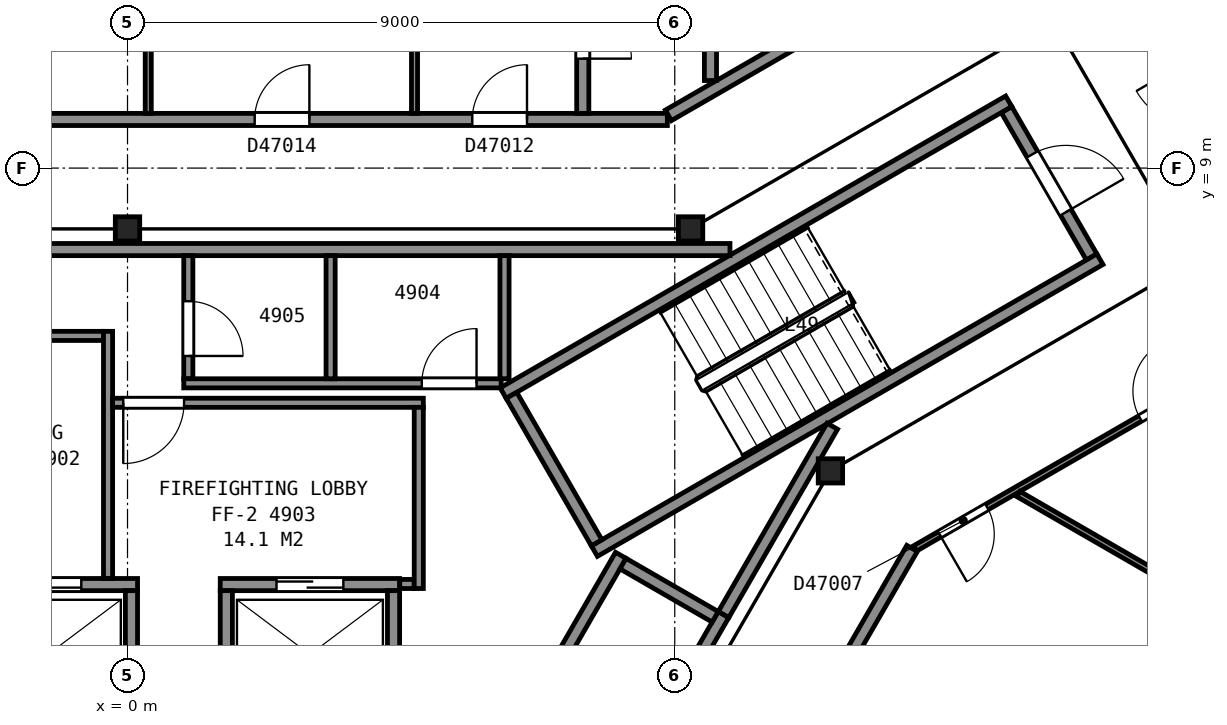
"""IFC4 building model, lengths in metres.
Left out: names, types, materials, properties, quantities, classifications, styles, units other than length and angle.
Written with IfcOpenShell. Run it as: python <this file> out.ifc"""

import sys

from ifc_helpers import new_model, si_unit, direction, frame, frame_2d, origin, origin_2d, place, context, subcontext, project, spatial, rectangle, i_section, extrude, element, fill, save


model = new_model("IFC4")
c1 = context("Model", 3, precision=1e-05, world=origin(), true_north=direction((0.0, 1.0)))
c2 = subcontext(c1, "Body", "Model", "MODEL_VIEW")
j1 = project(units=[si_unit("LENGTHUNIT", "METRE"), si_unit("PLANEANGLEUNIT", "RADIAN")], contexts=[c1])
p1 = place(None, origin())
s1 = spatial("IfcSite", under=j1, at=p1, CompositionType="ELEMENT")
p2 = place(p1, origin())
s2 = spatial("IfcBuilding", under=s1, at=p2, CompositionType="ELEMENT")
p3 = place(p2, frame((0.0, 0.0, 196.9)))
s3 = spatial("IfcBuildingStorey", under=s2, at=p3, CompositionType="ELEMENT", Elevation=196.9)
for number, where, z_axis, x_axis in (
    (1, (11.56, 4.02, 0.0), (0.0, 0.0, 1.0), (1.0, 0.0, 0.0)),
    (2, (9.26, 8.0, 0.0), (0.0, 0.0, 1.0), (1.0, 0.0, 0.0)),
    (3, (0.0, 8.0, 0.0), (0.0, 0.0, 1.0), (1.0, 0.0, 0.0)),
):
    element("IfcColumn", number, at=place(p3, frame(where, z_axis=z_axis, x_axis=x_axis)), inside=s3, PredefinedType="COLUMN", context=c2, shape_type="SweptSolid", body=[
        extrude(i_section(OverallWidth=0.401, OverallDepth=0.399, WebThickness=0.025, FlangeThickness=0.04, FilletRadius=0.015, at=origin_2d()), origin(), (0.0, 0.0, 1.0), 3.7),
    ])
p4 = place(p3, frame((15.855, 7.538, 0.0), z_axis=(0.0, 0.0, 1.0), x_axis=(-0.500049511043, 0.865996816683, 0.0)))
e4 = element("IfcWall", 4, at=p4, inside=s3, PredefinedType="PARTITIONING", context=c2, shape_type="SweptSolid", body=[
    extrude(rectangle(XDim=2.8, YDim=0.2, at=frame_2d((1.4, 0.0))), origin(), (0.0, 0.0, 1.0), 3.45),
])
p5 = place(p4, frame((0.85, 0.0, 0.0)))
e5 = element("IfcOpeningElement", 5, at=p5, cuts=e4, PredefinedType="OPENING", context=c2, shape_type="SweptSolid", body=[
    extrude(rectangle(XDim=1.1, YDim=2.1, at=frame_2d((0.55, 1.05))), frame((0.0, 0.11, 0.0), z_axis=(0.0, -1.0, 0.0), x_axis=(1.0, 0.0, 0.0)), (0.0, 0.0, 1.0), 0.22),
])
for number, where, z_axis, x_axis in (
    (6, (6.178, 5.299, 0.0), (0.0, 0.0, 1.0), (0.866, 0.5, 0.0)),
    (7, (7.678, 2.701, 0.0), (0.0, 0.0, 1.0), (0.866, 0.5, 0.0)),
):
    element("IfcWall", number, at=place(p3, frame(where, z_axis=z_axis, x_axis=x_axis)), inside=s3, PredefinedType="PARTITIONING", context=c2, shape_type="SweptSolid", body=[
        extrude(rectangle(XDim=9.6, YDim=0.2, at=frame_2d((4.8, 0.0))), origin(), (0.0, 0.0, 1.0), 3.45),
    ])
p6 = place(p3, frame((7.715, 2.838, 0.0), z_axis=(0.0, 0.0, 1.0), x_axis=(-0.500049511043, 0.865996816683, 0.0)))
e8 = element("IfcWall", 8, at=p6, inside=s3, PredefinedType="PARTITIONING", context=c2, shape_type="SweptSolid", body=[
    extrude(rectangle(XDim=2.8, YDim=0.2, at=frame_2d((1.4, 0.0))), origin(), (0.0, 0.0, 1.0), 3.45),
])
p7 = place(p3, frame((-2.785, 2.15, 0.0), z_axis=(0.0, 0.0, 1.0), x_axis=(1.0, 0.0, 0.0)))
e9 = element("IfcWall", 9, at=p7, inside=s3, PredefinedType="PARTITIONING", context=c2, shape_type="SweptSolid", body=[
    extrude(rectangle(XDim=2.95, YDim=0.2, at=frame_2d((1.475, 0.0))), origin(), (0.0, 0.0, 1.0), 3.7),
])
p8 = place(p7, frame((0.925, 0.0, 0.0)))
e10 = element("IfcOpeningElement", 10, at=p8, cuts=e9, PredefinedType="OPENING", context=c2, shape_type="SweptSolid", body=[
    extrude(rectangle(XDim=1.1, YDim=2.1, at=frame_2d((0.55, 1.05))), frame((0.0, 0.11, 0.0), z_axis=(0.0, -1.0, 0.0), x_axis=(1.0, 0.0, 0.0)), (0.0, 0.0, 1.0), 0.22),
])
p9 = place(p3, frame((1.525, 2.15, 0.0), z_axis=(0.0, 0.0, 1.0), x_axis=(1.0, 0.0, 0.0)))
e11 = element("IfcWall", 11, at=p9, inside=s3, PredefinedType="PARTITIONING", context=c2, shape_type="SweptSolid", body=[
    extrude(rectangle(XDim=2.95, YDim=0.2, at=frame_2d((1.475, 0.0))), origin(), (0.0, 0.0, 1.0), 3.7),
])
p10 = place(p9, frame((0.925, 0.0, 0.0)))
e12 = element("IfcOpeningElement", 12, at=p10, cuts=e11, PredefinedType="OPENING", context=c2, shape_type="SweptSolid", body=[
    extrude(rectangle(XDim=1.1, YDim=2.1, at=frame_2d((0.55, 1.05))), frame((0.0, 0.11, 0.0), z_axis=(0.0, -1.0, 0.0), x_axis=(1.0, 0.0, 0.0)), (0.0, 0.0, 1.0), 0.22),
])
p11 = place(p3, frame((7.351, -2.587, 0.0), z_axis=(0.0, 0.0, 1.0), x_axis=(0.500002801628, 0.866023786258, 0.0)))
e13 = element("IfcWall", 13, at=p11, inside=s3, PredefinedType="PARTITIONING", context=c2, shape_type="SweptSolid", body=[
    extrude(rectangle(XDim=4.9, YDim=0.2, at=frame_2d((2.45, 0.0))), origin(), (0.0, 0.0, 1.0), 3.7),
])
p12 = place(p3, frame((5.663, -1.612, 0.0), z_axis=(0.0, 0.0, 1.0), x_axis=(0.49998122708, 0.866036242063, 0.0)))
e14 = element("IfcWall", 14, at=p12, inside=s3, PredefinedType="PARTITIONING", context=c2, shape_type="SweptSolid", body=[
    extrude(rectangle(XDim=4.9, YDim=0.2, at=frame_2d((2.45, 0.0))), origin(), (0.0, 0.0, 1.0), 3.7),
])
for number, where, z_axis, x_axis in (
    (15, (4.375, 0.1, 0.0), (0.0, 0.0, 1.0), (0.0, 1.0, 0.0)),
    (16, (1.625, 0.1, 0.0), (0.0, 0.0, 1.0), (0.0, 1.0, 0.0)),
    (17, (0.065, 0.1, 0.0), (0.0, 0.0, 1.0), (0.0, 1.0, 0.0)),
):
    element("IfcWall", number, at=place(p3, frame(where, z_axis=z_axis, x_axis=x_axis)), inside=s3, PredefinedType="PARTITIONING", context=c2, shape_type="SweptSolid", body=[
        extrude(rectangle(XDim=1.95, YDim=0.2, at=frame_2d((0.975, 0.0))), origin(), (0.0, 0.0, 1.0), 3.7),
    ])
p13 = place(p3, frame((9.665, 1.62, 0.0), z_axis=(0.0, 0.0, 1.0), x_axis=(-0.866002029911, 0.500040482552, 0.0)))
e18 = element("IfcWall", 18, at=p13, inside=s3, PredefinedType="PARTITIONING", context=c2, shape_type="SweptSolid", body=[
    extrude(rectangle(XDim=1.75, YDim=0.2, at=frame_2d((0.875, 0.0))), origin(), (0.0, 0.0, 1.0), 3.7),
])
p14 = place(p3, frame((-3.933, 6.24, 0.0), z_axis=(0.0, 0.0, 1.0), x_axis=(1.0, 0.0, 0.0)))
e19 = element("IfcWall", 19, at=p14, inside=s3, PredefinedType="PARTITIONING", context=c2, shape_type="SweptSolid", body=[
    extrude(rectangle(XDim=3.538, YDim=0.15, at=frame_2d((1.769, 0.0))), origin(), (0.0, 0.0, 1.0), 3.45),
])
p15 = place(p14, frame((1.3, 0.0, 0.0)))
e20 = element("IfcOpeningElement", 20, at=p15, cuts=e19, PredefinedType="OPENING", context=c2, shape_type="SweptSolid", body=[
    extrude(rectangle(XDim=1.0, YDim=2.1, at=frame_2d((0.5, 1.05))), frame((0.0, 0.085, 0.0), z_axis=(0.0, -1.0, 0.0), x_axis=(1.0, 0.0, 0.0)), (0.0, 0.0, 1.0), 0.17),
])
p16 = place(p3, frame((-3.933, 7.66, 0.0), z_axis=(0.0, 0.0, 1.0), x_axis=(1.0, 0.0, 0.0)))
e21 = element("IfcWall", 21, at=p16, inside=s3, PredefinedType="PARTITIONING", context=c2, shape_type="SweptSolid", body=[
    extrude(rectangle(XDim=13.841, YDim=0.2, at=frame_2d((6.92, 0.0))), origin(), (0.0, 0.0, 1.0), 3.45),
])
p17 = place(p3, frame((-0.32, 2.252, 0.0), z_axis=(0.0, 0.0, 1.0), x_axis=(0.0, 1.0, 0.0)))
e22 = element("IfcWall", 22, at=p17, inside=s3, PredefinedType="PARTITIONING", context=c2, shape_type="SweptSolid", body=[
    extrude(rectangle(XDim=4.063, YDim=0.15, at=frame_2d((2.031, 0.0))), origin(), (0.0, 0.0, 1.0), 3.45),
])
p18 = place(p3, frame((-0.245, 5.14, 0.0), z_axis=(0.0, 0.0, 1.0), x_axis=(1.0, 0.0, 0.0)))
e23 = element("IfcWall", 23, at=p18, inside=s3, PredefinedType="PARTITIONING", context=c2, shape_type="SweptSolid", body=[
    extrude(rectangle(XDim=5.11, YDim=0.15, at=frame_2d((2.555, 0.0))), origin(), (0.0, 0.0, 1.0), 3.45),
])
p19 = place(p18, frame((0.175, 0.0, 0.0)))
e24 = element("IfcOpeningElement", 24, at=p19, cuts=e23, PredefinedType="OPENING", context=c2, shape_type="SweptSolid", body=[
    extrude(rectangle(XDim=1.0, YDim=2.1, at=frame_2d((0.5, 1.05))), frame((0.0, 0.085, 0.0), z_axis=(0.0, -1.0, 0.0), x_axis=(1.0, 0.0, 0.0)), (0.0, 0.0, 1.0), 0.17),
])
p20 = place(p3, frame((1.0, 7.56, 0.0), z_axis=(0.0, 0.0, 1.0), x_axis=(0.0, -1.0, 0.0)))
e25 = element("IfcWall", 25, at=p20, inside=s3, PredefinedType="PARTITIONING", context=c2, shape_type="SweptSolid", body=[
    extrude(rectangle(XDim=2.025, YDim=0.15, at=frame_2d((1.013, 0.0))), origin(), (0.0, 0.0, 1.0), 3.45),
])
p21 = place(p20, frame((0.75, 0.0, 0.0)))
e26 = element("IfcOpeningElement", 26, at=p21, cuts=e25, PredefinedType="OPENING", context=c2, shape_type="SweptSolid", body=[
    extrude(rectangle(XDim=0.9, YDim=2.1, at=frame_2d((0.45, 1.05))), frame((0.0, 0.085, 0.0), z_axis=(0.0, -1.0, 0.0), x_axis=(1.0, 0.0, 0.0)), (0.0, 0.0, 1.0), 0.17),
])
p22 = place(p3, frame((0.925, 5.46, 0.0), z_axis=(0.0, 0.0, 1.0), x_axis=(1.0, 0.0, 0.0)))
e27 = element("IfcWall", 27, at=p22, inside=s3, PredefinedType="PARTITIONING", context=c2, shape_type="SweptSolid", body=[
    extrude(rectangle(XDim=5.22, YDim=0.15, at=frame_2d((2.61, 0.0))), origin(), (0.0, 0.0, 1.0), 3.45),
])
p23 = place(p22, frame((3.915, 0.0, 0.0)))
e28 = element("IfcOpeningElement", 28, at=p23, cuts=e27, PredefinedType="OPENING", context=c2, shape_type="SweptSolid", body=[
    extrude(rectangle(XDim=0.9, YDim=2.1, at=frame_2d((0.45, 1.05))), frame((0.0, 0.085, 0.0), z_axis=(0.0, -1.0, 0.0), x_axis=(1.0, 0.0, 0.0)), (0.0, 0.0, 1.0), 0.17),
])
p24 = place(p3, frame((3.34, 5.535, 0.0), z_axis=(0.0, 0.0, 1.0), x_axis=(0.0, 1.0, 0.0)))
e29 = element("IfcWall", 29, at=p24, inside=s3, PredefinedType="PARTITIONING", context=c2, shape_type="SweptSolid", body=[
    extrude(rectangle(XDim=2.025, YDim=0.15, at=frame_2d((1.013, 0.0))), origin(), (0.0, 0.0, 1.0), 3.45),
])
p25 = place(p3, frame((4.477, 2.16, 0.0), z_axis=(0.0, 0.0, 1.0), x_axis=(1.0, 0.0, 0.0)))
e30 = element("IfcWall", 30, at=p25, inside=s3, PredefinedType="PARTITIONING", context=c2, shape_type="SweptSolid", body=[
    extrude(rectangle(XDim=0.238, YDim=0.15, at=frame_2d((0.119, 0.0))), origin(), (0.0, 0.0, 1.0), 3.45),
])
p26 = place(p3, frame((4.79, 2.085, 0.0), z_axis=(0.0, 0.0, 1.0), x_axis=(0.0, 1.0, 0.0)))
e31 = element("IfcWall", 31, at=p26, inside=s3, PredefinedType="PARTITIONING", context=c2, shape_type="SweptSolid", body=[
    extrude(rectangle(XDim=2.98, YDim=0.15, at=frame_2d((1.49, 0.0))), origin(), (0.0, 0.0, 1.0), 3.45),
])
p27 = place(p3, frame((6.2, 5.535, 0.0), z_axis=(0.0, 0.0, 1.0), x_axis=(0.0, 1.0, 0.0)))
e32 = element("IfcWall", 32, at=p27, inside=s3, PredefinedType="PARTITIONING", context=c2, shape_type="SweptSolid", body=[
    extrude(rectangle(XDim=2.025, YDim=0.15, at=frame_2d((1.013, 0.0))), origin(), (0.0, 0.0, 1.0), 3.45),
])
p28 = place(p3, frame((9.803, 1.658, 0.0), z_axis=(0.0, 0.0, 1.0), x_axis=(0.499943114462, 0.866058244174, 0.0)))
e33 = element("IfcWall", 33, at=p28, inside=s3, PredefinedType="PARTITIONING", context=c2, shape_type="SweptSolid", body=[
    extrude(rectangle(XDim=3.576, YDim=0.2, at=frame_2d((1.788, 0.0))), origin(), (0.0, 0.0, 1.0), 3.45),
])
p29 = place(p3, frame((-8.828, 9.8, 0.0), z_axis=(0.0, 0.0, 1.0), x_axis=(1.0, 0.0, 0.0)))
e34 = element("IfcWall", 34, at=p29, inside=s3, PredefinedType="PARTITIONING", context=c2, shape_type="SweptSolid", body=[
    extrude(rectangle(XDim=17.706, YDim=0.2, at=frame_2d((8.853, 0.0))), origin(), (0.0, 0.0, 1.0), 2.362),
])
p30 = place(p29, frame((14.498, 0.0, 0.0)))
e35 = element("IfcOpeningElement", 35, at=p30, cuts=e34, PredefinedType="OPENING", context=c2, shape_type="SweptSolid", body=[
    extrude(rectangle(XDim=0.9, YDim=2.1, at=frame_2d((0.45, 1.05))), frame((0.0, 0.11, 0.0), z_axis=(0.0, -1.0, 0.0), x_axis=(1.0, 0.0, 0.0)), (0.0, 0.0, 1.0), 0.22),
])
p31 = place(p29, frame((10.919, 0.0, 0.0)))
e36 = element("IfcOpeningElement", 36, at=p31, cuts=e34, PredefinedType="OPENING", context=c2, shape_type="SweptSolid", body=[
    extrude(rectangle(XDim=0.9, YDim=2.1, at=frame_2d((0.45, 1.05))), frame((0.0, 0.11, 0.0), z_axis=(0.0, -1.0, 0.0), x_axis=(1.0, 0.0, 0.0)), (0.0, 0.0, 1.0), 0.22),
])
p32 = place(p29, frame((6.113, 0.0, 0.0)))
e37 = element("IfcOpeningElement", 37, at=p32, cuts=e34, PredefinedType="OPENING", context=c2, shape_type="SweptSolid", body=[
    extrude(rectangle(XDim=0.9, YDim=2.1, at=frame_2d((0.45, 1.05))), frame((0.0, 0.11, 0.0), z_axis=(0.0, -1.0, 0.0), x_axis=(1.0, 0.0, 0.0)), (0.0, 0.0, 1.0), 0.22),
])
for number, where, z_axis, x_axis in (
    (38, (0.341, 9.9, 0.0), (0.0, 0.0, 1.0), (0.0, 1.0, 0.0)),
    (39, (4.72, 9.9, 0.0), (0.0, 0.0, 1.0), (0.0, 1.0, 0.0)),
):
    element("IfcWall", number, at=place(p3, frame(where, z_axis=z_axis, x_axis=x_axis)), inside=s3, PredefinedType="PARTITIONING", context=c2, shape_type="SweptSolid", body=[
        extrude(rectangle(XDim=8.435, YDim=0.1, at=frame_2d((4.218, 0.0))), origin(), (0.0, 0.0, 1.0), 2.362),
    ])
p33 = place(p3, frame((12.903, 2.745, 0.0), z_axis=(0.0, 0.0, 1.0), x_axis=(-0.499992063946, -0.866029985619, 0.0)))
e40 = element("IfcWall", 40, at=p33, inside=s3, PredefinedType="PARTITIONING", context=c2, shape_type="SweptSolid", body=[
    extrude(rectangle(XDim=12.907, YDim=0.2, at=frame_2d((6.454, 0.0))), origin(), (0.0, 0.0, 1.0), 2.362),
])
p34 = place(p33, frame((9.032, 0.0, 0.0)))
e41 = element("IfcOpeningElement", 41, at=p34, cuts=e40, PredefinedType="OPENING", context=c2, shape_type="SweptSolid", body=[
    extrude(rectangle(XDim=0.9, YDim=2.1, at=frame_2d((0.45, 1.05))), frame((0.0, 0.11, 0.0), z_axis=(0.0, -1.0, 0.0), x_axis=(1.0, 0.0, 0.0)), (0.0, 0.0, 1.0), 0.22),
])
p35 = place(p33, frame((5.349, 0.0, 0.0)))
e42 = element("IfcOpeningElement", 42, at=p35, cuts=e40, PredefinedType="OPENING", context=c2, shape_type="SweptSolid", body=[
    extrude(rectangle(XDim=0.9, YDim=2.1, at=frame_2d((0.45, 1.05))), frame((0.0, 0.11, 0.0), z_axis=(0.0, -1.0, 0.0), x_axis=(1.0, 0.0, 0.0)), (0.0, 0.0, 1.0), 0.22),
])
p36 = place(p3, frame((7.487, 12.7, 0.0), z_axis=(0.0, 0.0, 1.0), x_axis=(0.0, -1.0, 0.0)))
e43 = element("IfcWall", 43, at=p36, inside=s3, PredefinedType="PARTITIONING", context=c2, shape_type="SweptSolid", body=[
    extrude(rectangle(XDim=2.8, YDim=0.2, at=frame_2d((1.4, 0.0))), origin(), (0.0, 0.0, 1.0), 2.362),
])
p37 = place(p36, frame((1.1, 0.0, 0.0)))
e44 = element("IfcOpeningElement", 44, at=p37, cuts=e43, PredefinedType="OPENING", context=c2, shape_type="SweptSolid", body=[
    extrude(rectangle(XDim=0.8, YDim=2.1, at=frame_2d((0.4, 1.05))), frame((0.0, 0.11, 0.0), z_axis=(0.0, -1.0, 0.0), x_axis=(1.0, 0.0, 0.0)), (0.0, 0.0, 1.0), 0.22),
])
p38 = place(p3, frame((8.895, 9.867, 0.0), z_axis=(0.0, 0.0, 1.0), x_axis=(0.866079355551, 0.499906541154, 0.0)))
e45 = element("IfcWall", 45, at=p38, inside=s3, PredefinedType="PARTITIONING", context=c2, shape_type="SweptSolid", body=[
    extrude(rectangle(XDim=8.113, YDim=0.2, at=frame_2d((4.056, 0.0))), origin(), (0.0, 0.0, 1.0), 2.362),
])
p39 = place(p38, frame((5.201, 0.0, 0.0)))
e46 = element("IfcOpeningElement", 46, at=p39, cuts=e45, PredefinedType="OPENING", context=c2, shape_type="SweptSolid", body=[
    extrude(rectangle(XDim=0.9, YDim=2.1, at=frame_2d((0.45, 1.05))), frame((0.0, 0.11, 0.0), z_axis=(0.0, -1.0, 0.0), x_axis=(1.0, 0.0, 0.0)), (0.0, 0.0, 1.0), 0.22),
])
p40 = place(p3, frame((9.587, 10.44, 0.0), z_axis=(0.0, 0.0, 1.0), x_axis=(0.0, 1.0, 0.0)))
e47 = element("IfcWall", 47, at=p40, inside=s3, PredefinedType="PARTITIONING", context=c2, shape_type="SweptSolid", body=[
    extrude(rectangle(XDim=7.895, YDim=0.2, at=frame_2d((3.947, 0.0))), origin(), (0.0, 0.0, 1.0), 2.362),
])
p41 = place(p3, frame((20.023, 6.826, 0.0), z_axis=(0.0, 0.0, 1.0), x_axis=(-0.86608949446, -0.499888975259, 0.0)))
e48 = element("IfcWall", 48, at=p41, inside=s3, PredefinedType="PARTITIONING", context=c2, shape_type="SweptSolid", body=[
    extrude(rectangle(XDim=8.165, YDim=0.1, at=frame_2d((4.083, 0.0))), origin(), (0.0, 0.0, 1.0), 2.362),
])
p42 = place(p41, frame((6.8, 0.0, 0.0)))
e49 = element("IfcOpeningElement", 49, at=p42, cuts=e48, PredefinedType="OPENING", context=c2, shape_type="SweptSolid", body=[
    extrude(rectangle(XDim=0.9, YDim=2.1, at=frame_2d((0.45, 1.05))), frame((0.0, 0.06, 0.0), z_axis=(0.0, -1.0, 0.0), x_axis=(1.0, 0.0, 0.0)), (0.0, 0.0, 1.0), 0.12),
])
p43 = place(p41, frame((2.989, 0.0, 0.0)))
e50 = element("IfcOpeningElement", 50, at=p43, cuts=e48, PredefinedType="OPENING", context=c2, shape_type="SweptSolid", body=[
    extrude(rectangle(XDim=0.9, YDim=2.1, at=frame_2d((0.45, 1.05))), frame((0.0, 0.06, 0.0), z_axis=(0.0, -1.0, 0.0), x_axis=(1.0, 0.0, 0.0)), (0.0, 0.0, 1.0), 0.12),
])
p44 = place(p3, frame((14.651, 3.64, 0.0), z_axis=(0.0, 0.0, 1.0), x_axis=(0.866021145342, -0.500007375767, 0.0)))
e51 = element("IfcWall", 51, at=p44, inside=s3, PredefinedType="PARTITIONING", context=c2, shape_type="SweptSolid", body=[
    extrude(rectangle(XDim=7.467, YDim=0.1, at=frame_2d((3.733, 0.0))), origin(), (0.0, 0.0, 1.0), 2.362),
])
p45 = place(p3, frame((15.928, 13.812, 0.0), z_axis=(0.0, 0.0, 1.0), x_axis=(0.500422653123, -0.865781247337, 0.0)))
e52 = element("IfcWall", 52, at=p45, inside=s3, PredefinedType="PARTITIONING", context=c2, shape_type="SweptSolid", body=[
    extrude(rectangle(XDim=8.047, YDim=0.1, at=frame_2d((4.024, 0.0))), origin(), (0.0, 0.0, 1.0), 2.362),
])
p46 = place(p45, frame((3.4, 0.0, 0.0)))
e53 = element("IfcOpeningElement", 53, at=p46, cuts=e52, PredefinedType="OPENING", context=c2, shape_type="SweptSolid", body=[
    extrude(rectangle(XDim=1.2, YDim=2.1, at=frame_2d((0.6, 1.05))), frame((0.0, 0.06, 0.0), z_axis=(0.0, -1.0, 0.0), x_axis=(1.0, 0.0, 0.0)), (0.0, 0.0, 1.0), 0.12),
])
p47 = place(p5, origin())
e54 = element("IfcDoor", 54, at=p47, inside=s3, OperationType="SINGLE_SWING_LEFT", PredefinedType="DOOR", context=c2, shape_type="SweptSolid", body=[
    extrude(rectangle(XDim=1.1, YDim=2.1, at=frame_2d((0.55, 1.05))), frame((0.0, 0.025, 0.0), z_axis=(0.0, -1.0, 0.0), x_axis=(1.0, 0.0, 0.0)), (0.0, 0.0, 1.0), 0.05),
])
fill(e5, e54)
p48 = place(p8, origin())
e55 = element("IfcDoor", 55, at=p48, inside=s3, OperationType="SLIDING_TO_LEFT", PredefinedType="DOOR", context=c2, shape_type="SweptSolid", body=[
    extrude(rectangle(XDim=1.1, YDim=2.1, at=frame_2d((0.55, 1.05))), frame((0.0, 0.025, 0.0), z_axis=(0.0, -1.0, 0.0), x_axis=(1.0, 0.0, 0.0)), (0.0, 0.0, 1.0), 0.05),
])
fill(e10, e55)
p49 = place(p10, origin())
e56 = element("IfcDoor", 56, at=p49, inside=s3, OperationType="SLIDING_TO_RIGHT", PredefinedType="DOOR", context=c2, shape_type="SweptSolid", body=[
    extrude(rectangle(XDim=1.1, YDim=2.1, at=frame_2d((0.55, 1.05))), frame((0.0, 0.025, 0.0), z_axis=(0.0, -1.0, 0.0), x_axis=(1.0, 0.0, 0.0)), (0.0, 0.0, 1.0), 0.05),
])
fill(e12, e56)
p50 = place(p19, origin())
e57 = element("IfcDoor", 57, at=p50, inside=s3, OperationType="SINGLE_SWING_LEFT", PredefinedType="DOOR", context=c2, shape_type="SweptSolid", body=[
    extrude(rectangle(XDim=1.0, YDim=2.1, at=frame_2d((0.5, 1.05))), frame((0.0, 0.025, 0.0), z_axis=(0.0, -1.0, 0.0), x_axis=(1.0, 0.0, 0.0)), (0.0, 0.0, 1.0), 0.05),
])
fill(e24, e57)
p51 = place(p21, origin())
e58 = element("IfcDoor", 58, at=p51, inside=s3, OperationType="SINGLE_SWING_RIGHT", PredefinedType="DOOR", context=c2, shape_type="SweptSolid", body=[
    extrude(rectangle(XDim=0.9, YDim=2.1, at=frame_2d((0.45, 1.05))), frame((0.0, 0.025, 0.0), z_axis=(0.0, -1.0, 0.0), x_axis=(1.0, 0.0, 0.0)), (0.0, 0.0, 1.0), 0.05),
])
fill(e26, e58)
p52 = place(p23, origin())
e59 = element("IfcDoor", 59, at=p52, inside=s3, OperationType="SINGLE_SWING_RIGHT", PredefinedType="DOOR", context=c2, shape_type="SweptSolid", body=[
    extrude(rectangle(XDim=0.9, YDim=2.1, at=frame_2d((0.45, 1.05))), frame((0.0, 0.025, 0.0), z_axis=(0.0, -1.0, 0.0), x_axis=(1.0, 0.0, 0.0)), (0.0, 0.0, 1.0), 0.05),
])
fill(e28, e59)
p53 = place(p30, origin())
e60 = element("IfcDoor", 60, at=p53, inside=s3, OperationType="SINGLE_SWING_RIGHT", PredefinedType="DOOR", context=c2, shape_type="SweptSolid", body=[
    extrude(rectangle(XDim=0.9, YDim=2.1, at=frame_2d((0.45, 1.05))), frame((0.0, 0.025, 0.0), z_axis=(0.0, -1.0, 0.0), x_axis=(1.0, 0.0, 0.0)), (0.0, 0.0, 1.0), 0.05),
])
fill(e35, e60)
p54 = place(p31, origin())
e61 = element("IfcDoor", 61, at=p54, inside=s3, OperationType="SINGLE_SWING_RIGHT", PredefinedType="DOOR", context=c2, shape_type="SweptSolid", body=[
    extrude(rectangle(XDim=0.9, YDim=2.1, at=frame_2d((0.45, 1.05))), frame((0.0, 0.025, 0.0), z_axis=(0.0, -1.0, 0.0), x_axis=(1.0, 0.0, 0.0)), (0.0, 0.0, 1.0), 0.05),
])
fill(e36, e61)
p55 = place(p37, origin())
e62 = element("IfcDoor", 62, at=p55, inside=s3, OperationType="SINGLE_SWING_RIGHT", PredefinedType="DOOR", context=c2, shape_type="SweptSolid", body=[
    extrude(rectangle(XDim=0.8, YDim=2.1, at=frame_2d((0.4, 1.05))), frame((0.0, 0.025, 0.0), z_axis=(0.0, -1.0, 0.0), x_axis=(1.0, 0.0, 0.0)), (0.0, 0.0, 1.0), 0.05),
])
fill(e44, e62)
p56 = place(p42, origin())
e63 = element("IfcDoor", 63, at=p56, inside=s3, OperationType="SINGLE_SWING_RIGHT", PredefinedType="DOOR", context=c2, shape_type="SweptSolid", body=[
    extrude(rectangle(XDim=0.9, YDim=2.1, at=frame_2d((0.45, 1.05))), frame((0.0, 0.025, 0.0), z_axis=(0.0, -1.0, 0.0), x_axis=(1.0, 0.0, 0.0)), (0.0, 0.0, 1.0), 0.05),
])
fill(e49, e63)
p57 = place(p43, origin())
e64 = element("IfcDoor", 64, at=p57, inside=s3, OperationType="SINGLE_SWING_LEFT", PredefinedType="DOOR", context=c2, shape_type="SweptSolid", body=[
    extrude(rectangle(XDim=0.9, YDim=2.1, at=frame_2d((0.45, 1.05))), frame((0.0, 0.025, 0.0), z_axis=(0.0, -1.0, 0.0), x_axis=(1.0, 0.0, 0.0)), (0.0, 0.0, 1.0), 0.05),
])
fill(e50, e64)
save(model, sys.argv[1])
